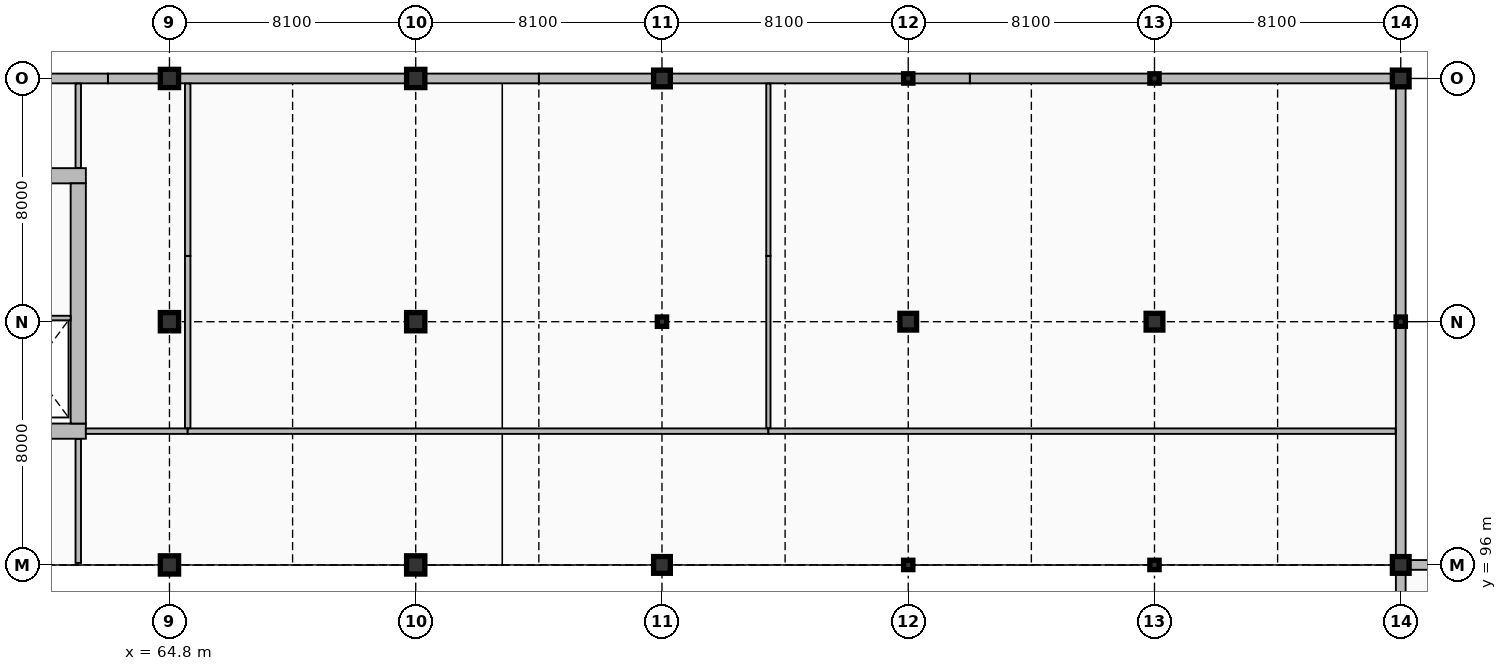
"""IFC4 building model, lengths in metres.
Left out: names, types, materials, properties, quantities, classifications, styles, units other than length and angle.
Written with IfcOpenShell. Run it as: python <this file> out.ifc"""

import sys

from ifc_helpers import new_model, si_unit, direction, frame, frame_2d, origin, origin_2d, place, context, subcontext, project, spatial, rectangle, i_section, extrude, element, fill, save


model = new_model("IFC4")
c1 = context("Model", 3, precision=1e-05, world=origin(), true_north=direction((0.0, 1.0)))
c2 = subcontext(c1, "Body", "Model", "MODEL_VIEW")
j1 = project(units=[si_unit("LENGTHUNIT", "METRE"), si_unit("PLANEANGLEUNIT", "RADIAN")], contexts=[c1])
p1 = place(None, origin())
s1 = spatial("IfcSite", under=j1, at=p1, CompositionType="ELEMENT")
p2 = place(p1, origin())
s2 = spatial("IfcBuilding", under=s1, at=p2, CompositionType="ELEMENT")
p3 = place(p2, frame((0.0, 0.0, 14.7)))
s3 = spatial("IfcBuildingStorey", under=s2, at=p3, CompositionType="ELEMENT", Elevation=14.7)
p4 = place(p3, frame((46.75, 100.4, 0.0), z_axis=(0.0, 0.0, 1.0), x_axis=(1.0, 0.0, 0.0)))
e1 = element("IfcWall", 1, at=p4, inside=s3, PredefinedType="SHEAR", context=c2, shape_type="SweptSolid", body=[
    extrude(rectangle(XDim=15.3, YDim=0.5, at=frame_2d((7.65, 0.0))), origin(), (0.0, 0.0, 1.0), 5.1),
])
p5 = place(p4, frame((1.0, 0.0, 0.0)))
e2 = element("IfcOpeningElement", 2, at=p5, cuts=e1, PredefinedType="OPENING", context=c2, shape_type="SweptSolid", body=[
    extrude(rectangle(XDim=1.15, YDim=2.25, at=frame_2d((0.575, 1.125))), frame((0.0, 0.26, 0.0), z_axis=(0.0, -1.0, 0.0), x_axis=(1.0, 0.0, 0.0)), (0.0, 0.0, 1.0), 0.52),
])
p6 = place(p4, frame((10.282, 0.0, 0.0)))
e3 = element("IfcOpeningElement", 3, at=p6, cuts=e1, PredefinedType="OPENING", context=c2, shape_type="SweptSolid", body=[
    extrude(rectangle(XDim=1.1, YDim=2.2, at=frame_2d((0.55, 1.1))), frame((0.0, 0.26, 0.0), z_axis=(0.0, -1.0, 0.0), x_axis=(1.0, 0.0, 0.0)), (0.0, 0.0, 1.0), 0.52),
])
p7 = place(p4, frame((12.998, 0.0, 0.0)))
e4 = element("IfcOpeningElement", 4, at=p7, cuts=e1, PredefinedType="OPENING", context=c2, shape_type="SweptSolid", body=[
    extrude(rectangle(XDim=1.1, YDim=2.2, at=frame_2d((0.55, 1.1))), frame((0.0, 0.26, 0.0), z_axis=(0.0, -1.0, 0.0), x_axis=(1.0, 0.0, 0.0)), (0.0, 0.0, 1.0), 0.52),
])
p8 = place(p3, frame((46.75, 108.8, 0.0), z_axis=(0.0, 0.0, 1.0), x_axis=(1.0, 0.0, 0.0)))
e5 = element("IfcWall", 5, at=p8, inside=s3, PredefinedType="SHEAR", context=c2, shape_type="SweptSolid", body=[
    extrude(rectangle(XDim=15.3, YDim=0.5, at=frame_2d((7.65, 0.0))), origin(), (0.0, 0.0, 1.0), 5.1),
])
p9 = place(p3, frame((61.8, 100.65, 0.0), z_axis=(0.0, 0.0, 1.0), x_axis=(0.0, 1.0, 0.0)))
e6 = element("IfcWall", 6, at=p9, inside=s3, PredefinedType="SHEAR", context=c2, shape_type="SweptSolid", body=[
    extrude(rectangle(XDim=7.9, YDim=0.5, at=frame_2d((3.95, 0.0))), origin(), (0.0, 0.0, 1.0), 5.1),
])
for number, where, z_axis, x_axis in (
    (7, (64.8, 96.0, 0.0), (0.0, 0.0, 1.0), (1.0, 0.0, 0.0)),
    (8, (64.8, 104.0, 0.0), (0.0, 0.0, 1.0), (1.0, 0.0, 0.0)),
    (9, (64.8, 112.0, 0.0), (0.0, 0.0, 1.0), (1.0, 0.0, 0.0)),
    (10, (72.9, 96.0, 0.0), (0.0, 0.0, 1.0), (1.0, 0.0, 0.0)),
    (11, (72.9, 104.0, 0.0), (0.0, 0.0, 1.0), (1.0, 0.0, 0.0)),
    (12, (72.9, 112.0, 0.0), (0.0, 0.0, 1.0), (1.0, 0.0, 0.0)),
):
    element("IfcColumn", number, at=place(p3, frame(where, z_axis=z_axis, x_axis=x_axis)), inside=s3, PredefinedType="COLUMN", context=c2, shape_type="SweptSolid", body=[
        extrude(rectangle(XDim=0.6, YDim=0.6, at=origin_2d()), origin(), (0.0, 0.0, 1.0), 5.1),
    ])
p10 = place(p3, frame((81.0, 96.0, 0.0), z_axis=(0.0, 0.0, 1.0), x_axis=(1.0, 0.0, 0.0)))
e13 = element("IfcColumn", 13, at=p10, inside=s3, PredefinedType="COLUMN", context=c2, shape_type="SweptSolid", body=[
    extrude(rectangle(XDim=0.55, YDim=0.55, at=origin_2d()), origin(), (0.0, 0.0, 1.0), 5.1),
])
p11 = place(p3, frame((81.0, 104.0, 0.0), z_axis=(0.0, 0.0, 1.0), x_axis=(1.0, 0.0, 0.0)))
e14 = element("IfcColumn", 14, at=p11, inside=s3, PredefinedType="COLUMN", context=c2, shape_type="SweptSolid", body=[
    extrude(i_section(OverallWidth=0.305, OverallDepth=0.308, WebThickness=0.01, FlangeThickness=0.015, FilletRadius=0.015, at=origin_2d()), origin(), (0.0, 0.0, 1.0), 5.1),
])
p12 = place(p3, frame((81.0, 112.0, 0.0), z_axis=(0.0, 0.0, 1.0), x_axis=(1.0, 0.0, 0.0)))
e15 = element("IfcColumn", 15, at=p12, inside=s3, PredefinedType="COLUMN", context=c2, shape_type="SweptSolid", body=[
    extrude(rectangle(XDim=0.55, YDim=0.55, at=origin_2d()), origin(), (0.0, 0.0, 1.0), 5.1),
])
p13 = place(p3, frame((89.1, 96.0, 0.0), z_axis=(0.0, 0.0, 1.0), x_axis=(1.0, 0.0, 0.0)))
e16 = element("IfcColumn", 16, at=p13, inside=s3, PredefinedType="COLUMN", context=c2, shape_type="SweptSolid", body=[
    extrude(i_section(OverallWidth=0.305, OverallDepth=0.308, WebThickness=0.01, FlangeThickness=0.015, FilletRadius=0.015, at=origin_2d()), origin(), (0.0, 0.0, 1.0), 5.1),
])
p14 = place(p3, frame((89.1, 104.0, 0.0), z_axis=(0.0, 0.0, 1.0), x_axis=(1.0, 0.0, 0.0)))
e17 = element("IfcColumn", 17, at=p14, inside=s3, PredefinedType="COLUMN", context=c2, shape_type="SweptSolid", body=[
    extrude(rectangle(XDim=0.55, YDim=0.55, at=origin_2d()), origin(), (0.0, 0.0, 1.0), 5.1),
])
for number, where, z_axis, x_axis in (
    (18, (89.1, 112.0, 0.0), (0.0, 0.0, 1.0), (1.0, 0.0, 0.0)),
    (19, (97.2, 96.0, 0.0), (0.0, 0.0, 1.0), (1.0, 0.0, 0.0)),
):
    element("IfcColumn", number, at=place(p3, frame(where, z_axis=z_axis, x_axis=x_axis)), inside=s3, PredefinedType="COLUMN", context=c2, shape_type="SweptSolid", body=[
        extrude(i_section(OverallWidth=0.305, OverallDepth=0.308, WebThickness=0.01, FlangeThickness=0.015, FilletRadius=0.015, at=origin_2d()), origin(), (0.0, 0.0, 1.0), 5.1),
    ])
p15 = place(p3, frame((97.2, 104.0, 0.0), z_axis=(0.0, 0.0, 1.0), x_axis=(1.0, 0.0, 0.0)))
e20 = element("IfcColumn", 20, at=p15, inside=s3, PredefinedType="COLUMN", context=c2, shape_type="SweptSolid", body=[
    extrude(rectangle(XDim=0.55, YDim=0.55, at=origin_2d()), origin(), (0.0, 0.0, 1.0), 5.1),
])
p16 = place(p3, frame((97.2, 112.0, 0.0), z_axis=(0.0, 0.0, 1.0), x_axis=(1.0, 0.0, 0.0)))
e21 = element("IfcColumn", 21, at=p16, inside=s3, PredefinedType="COLUMN", context=c2, shape_type="SweptSolid", body=[
    extrude(i_section(OverallWidth=0.305, OverallDepth=0.308, WebThickness=0.01, FlangeThickness=0.015, FilletRadius=0.015, at=origin_2d()), origin(), (0.0, 0.0, 1.0), 5.1),
])
p17 = place(p3, frame((105.3, 96.0, 0.0), z_axis=(0.0, 0.0, 1.0), x_axis=(1.0, 0.0, 0.0)))
e22 = element("IfcColumn", 22, at=p17, inside=s3, PredefinedType="COLUMN", context=c2, shape_type="SweptSolid", body=[
    extrude(rectangle(XDim=0.55, YDim=0.55, at=origin_2d()), origin(), (0.0, 0.0, 1.0), 5.1),
])
p18 = place(p3, frame((105.3, 104.0, 0.0), z_axis=(0.0, 0.0, 1.0), x_axis=(1.0, 0.0, 0.0)))
e23 = element("IfcColumn", 23, at=p18, inside=s3, PredefinedType="COLUMN", context=c2, shape_type="SweptSolid", body=[
    extrude(i_section(OverallWidth=0.305, OverallDepth=0.308, WebThickness=0.01, FlangeThickness=0.015, FilletRadius=0.015, at=origin_2d()), origin(), (0.0, 0.0, 1.0), 5.1),
])
p19 = place(p3, frame((105.3, 112.0, 0.0), z_axis=(0.0, 0.0, 1.0), x_axis=(1.0, 0.0, 0.0)))
e24 = element("IfcColumn", 24, at=p19, inside=s3, PredefinedType="COLUMN", context=c2, shape_type="SweptSolid", body=[
    extrude(rectangle(XDim=0.55, YDim=0.55, at=origin_2d()), origin(), (0.0, 0.0, 1.0), 5.1),
])
p20 = place(p3, frame((117.54, 96.0, 0.0), z_axis=(0.0, 0.0, 1.0), x_axis=(-1.0, 0.0, 0.0)))
e25 = element("IfcWall", 25, at=p20, inside=s3, PredefinedType="SOLIDWALL", context=c2, shape_type="SweptSolid", body=[
    extrude(rectangle(XDim=12.06, YDim=0.32, at=frame_2d((6.03, 0.0))), origin(), (0.0, 0.0, 1.0), 4.144),
])
p21 = place(p20, frame((7.2, 0.0, 0.85)))
e26 = element("IfcOpeningElement", 26, at=p21, cuts=e25, PredefinedType="OPENING", context=c2, shape_type="SweptSolid", body=[
    extrude(rectangle(XDim=1.8, YDim=2.1, at=frame_2d((0.9, 1.05))), frame((0.0, 0.17, 0.0), z_axis=(0.0, -1.0, 0.0), x_axis=(1.0, 0.0, 0.0)), (0.0, 0.0, 1.0), 0.34),
])
p22 = place(p3, frame((105.3, 96.18, 0.0), z_axis=(0.0, 0.0, 1.0), x_axis=(0.0, 1.0, 0.0)))
e27 = element("IfcWall", 27, at=p22, inside=s3, PredefinedType="SOLIDWALL", context=c2, shape_type="SweptSolid", body=[
    extrude(rectangle(XDim=15.82, YDim=0.32, at=frame_2d((7.91, 0.0))), origin(), (0.0, 0.0, 1.0), 4.332),
])
p23 = place(p22, frame((9.45, 0.0, 0.85)))
e28 = element("IfcOpeningElement", 28, at=p23, cuts=e27, PredefinedType="OPENING", context=c2, shape_type="SweptSolid", body=[
    extrude(rectangle(XDim=1.8, YDim=2.4, at=frame_2d((0.9, 1.2))), frame((0.0, 0.17, 0.0), z_axis=(0.0, -1.0, 0.0), x_axis=(1.0, 0.0, 0.0)), (0.0, 0.0, 1.0), 0.34),
])
p24 = place(p3, frame((105.3, 112.0, 0.0), z_axis=(0.0, 0.0, 1.0), x_axis=(-1.0, 0.0, 0.0)))
e29 = element("IfcWall", 29, at=p24, inside=s3, PredefinedType="SOLIDWALL", context=c2, shape_type="SweptSolid", body=[
    extrude(rectangle(XDim=14.175, YDim=0.32, at=frame_2d((7.087, 0.0))), origin(), (0.0, 0.0, 1.0), 4.232),
])
p25 = place(p24, frame((3.6, 0.0, 0.95)))
e30 = element("IfcOpeningElement", 30, at=p25, cuts=e29, PredefinedType="OPENING", context=c2, shape_type="SweptSolid", body=[
    extrude(rectangle(XDim=2.1, YDim=1.8, at=frame_2d((1.05, 0.9))), frame((0.0, 0.17, 0.0), z_axis=(0.0, -1.0, 0.0), x_axis=(1.0, 0.0, 0.0)), (0.0, 0.0, 1.0), 0.34),
])
p26 = place(p3, frame((91.125, 112.0, 0.0), z_axis=(0.0, 0.0, 1.0), x_axis=(-1.0, 0.0, 0.0)))
e31 = element("IfcWall", 31, at=p26, inside=s3, PredefinedType="SOLIDWALL", context=c2, shape_type="SweptSolid", body=[
    extrude(rectangle(XDim=14.175, YDim=0.32, at=frame_2d((7.087, 0.0))), origin(), (0.0, 0.0, 1.0), 4.232),
])
p27 = place(p26, frame((3.6, 0.0, 0.95)))
e32 = element("IfcOpeningElement", 32, at=p27, cuts=e31, PredefinedType="OPENING", context=c2, shape_type="SweptSolid", body=[
    extrude(rectangle(XDim=2.25, YDim=1.8, at=frame_2d((1.125, 0.9))), frame((0.0, 0.17, 0.0), z_axis=(0.0, -1.0, 0.0), x_axis=(1.0, 0.0, 0.0)), (0.0, 0.0, 1.0), 0.34),
])
p28 = place(p3, frame((76.95, 112.0, 0.0), z_axis=(0.0, 0.0, 1.0), x_axis=(-1.0, 0.0, 0.0)))
e33 = element("IfcWall", 33, at=p28, inside=s3, PredefinedType="SOLIDWALL", context=c2, shape_type="SweptSolid", body=[
    extrude(rectangle(XDim=14.175, YDim=0.32, at=frame_2d((7.087, 0.0))), origin(), (0.0, 0.0, 1.0), 4.232),
])
p29 = place(p28, frame((5.85, 0.0, 0.95)))
e34 = element("IfcOpeningElement", 34, at=p29, cuts=e33, PredefinedType="OPENING", context=c2, shape_type="SweptSolid", body=[
    extrude(rectangle(XDim=2.4, YDim=1.6, at=frame_2d((1.2, 0.8))), frame((0.0, 0.17, 0.0), z_axis=(0.0, -1.0, 0.0), x_axis=(1.0, 0.0, 0.0)), (0.0, 0.0, 1.0), 0.34),
])
p30 = place(p3, frame((62.775, 112.0, 0.0), z_axis=(0.0, 0.0, 1.0), x_axis=(-1.0, 0.0, 0.0)))
e35 = element("IfcWall", 35, at=p30, inside=s3, PredefinedType="SOLIDWALL", context=c2, shape_type="SweptSolid", body=[
    extrude(rectangle(XDim=14.175, YDim=0.32, at=frame_2d((7.087, 0.0))), origin(), (0.0, 0.0, 1.0), 4.232),
])
p31 = place(p30, frame((8.1, 0.0, 0.95)))
e36 = element("IfcOpeningElement", 36, at=p31, cuts=e35, PredefinedType="OPENING", context=c2, shape_type="SweptSolid", body=[
    extrude(rectangle(XDim=2.7, YDim=1.8, at=frame_2d((1.35, 0.9))), frame((0.0, 0.17, 0.0), z_axis=(0.0, -1.0, 0.0), x_axis=(1.0, 0.0, 0.0)), (0.0, 0.0, 1.0), 0.34),
])
p32 = place(p3, frame((105.3, 95.82, 0.0), z_axis=(0.0, 0.0, 1.0), x_axis=(0.0, -1.0, 0.0)))
e37 = element("IfcWall", 37, at=p32, inside=s3, PredefinedType="SOLIDWALL", context=c2, shape_type="SweptSolid", body=[
    extrude(rectangle(XDim=15.64, YDim=0.32, at=frame_2d((7.82, 0.0))), origin(), (0.0, 0.0, 1.0), 4.332),
])
p33 = place(p32, frame((4.95, 0.0, 0.85)))
e38 = element("IfcOpeningElement", 38, at=p33, cuts=e37, PredefinedType="OPENING", context=c2, shape_type="SweptSolid", body=[
    extrude(rectangle(XDim=0.75, YDim=2.2, at=frame_2d((0.375, 1.1))), frame((0.0, 0.17, 0.0), z_axis=(0.0, -1.0, 0.0), x_axis=(1.0, 0.0, 0.0)), (0.0, 0.0, 1.0), 0.34),
])
p34 = place(p3, frame((56.3, 104.12, 0.0), z_axis=(0.0, 0.0, 1.0), x_axis=(1.0, 0.0, 0.0)))
e39 = element("IfcWall", 39, at=p34, inside=s3, PredefinedType="PARTITIONING", context=c2, shape_type="SweptSolid", body=[
    extrude(rectangle(XDim=5.25, YDim=0.15, at=frame_2d((2.625, 0.0))), origin(), (0.0, 0.0, 1.0), 4.84),
])
p35 = place(p3, frame((62.05, 100.4, 0.0), z_axis=(0.0, 0.0, 1.0), x_axis=(1.0, 0.0, 0.0)))
e40 = element("IfcWall", 40, at=p35, inside=s3, PredefinedType="PARTITIONING", context=c2, shape_type="SweptSolid", body=[
    extrude(rectangle(XDim=3.35, YDim=0.18, at=frame_2d((1.675, 0.0))), origin(), (0.0, 0.0, 1.0), 4.84),
])
p36 = place(p35, frame((1.075, 0.0, 0.0)))
e41 = element("IfcOpeningElement", 41, at=p36, cuts=e40, PredefinedType="OPENING", context=c2, shape_type="SweptSolid", body=[
    extrude(rectangle(XDim=1.2, YDim=2.2, at=frame_2d((0.6, 1.1))), frame((0.0, 0.1, 0.0), z_axis=(0.0, -1.0, 0.0), x_axis=(1.0, 0.0, 0.0)), (0.0, 0.0, 1.0), 0.2),
])
p37 = place(p3, frame((65.4, 100.4, 0.0), z_axis=(0.0, 0.0, 1.0), x_axis=(1.0, 0.0, 0.0)))
e42 = element("IfcWall", 42, at=p37, inside=s3, PredefinedType="PARTITIONING", context=c2, shape_type="SweptSolid", body=[
    extrude(rectangle(XDim=19.1, YDim=0.18, at=frame_2d((9.55, 0.0))), origin(), (0.0, 0.0, 1.0), 4.84),
])
p38 = place(p37, frame((8.95, 0.0, 0.0)))
e43 = element("IfcOpeningElement", 43, at=p38, cuts=e42, PredefinedType="OPENING", context=c2, shape_type="SweptSolid", body=[
    extrude(rectangle(XDim=1.2, YDim=2.3, at=frame_2d((0.6, 1.15))), frame((0.0, 0.1, 0.0), z_axis=(0.0, -1.0, 0.0), x_axis=(1.0, 0.0, 0.0)), (0.0, 0.0, 1.0), 0.2),
])
p39 = place(p3, frame((84.5, 100.4, 0.0), z_axis=(0.0, 0.0, 1.0), x_axis=(1.0, 0.0, 0.0)))
e44 = element("IfcWall", 44, at=p39, inside=s3, PredefinedType="PARTITIONING", context=c2, shape_type="SweptSolid", body=[
    extrude(rectangle(XDim=20.632, YDim=0.18, at=frame_2d((10.316, 0.0))), origin(), (0.0, 0.0, 1.0), 4.84),
])
p40 = place(p39, frame((9.716, 0.0, 0.0)))
e45 = element("IfcOpeningElement", 45, at=p40, cuts=e44, PredefinedType="OPENING", context=c2, shape_type="SweptSolid", body=[
    extrude(rectangle(XDim=1.2, YDim=2.3, at=frame_2d((0.6, 1.15))), frame((0.0, 0.1, 0.0), z_axis=(0.0, -1.0, 0.0), x_axis=(1.0, 0.0, 0.0)), (0.0, 0.0, 1.0), 0.2),
])
p41 = place(p3, frame((61.8, 96.065, 0.0), z_axis=(0.0, 0.0, 1.0), x_axis=(0.0, 1.0, 0.0)))
e46 = element("IfcWall", 46, at=p41, inside=s3, PredefinedType="PARTITIONING", context=c2, shape_type="SweptSolid", body=[
    extrude(rectangle(XDim=4.077, YDim=0.18, at=frame_2d((2.039, 0.0))), origin(), (0.0, 0.0, 1.0), 4.84),
])
p42 = place(p41, frame((1.489, 0.0, 0.0)))
e47 = element("IfcOpeningElement", 47, at=p42, cuts=e46, PredefinedType="OPENING", context=c2, shape_type="SweptSolid", body=[
    extrude(rectangle(XDim=1.1, YDim=2.2, at=frame_2d((0.55, 1.1))), frame((0.0, 0.1, 0.0), z_axis=(0.0, -1.0, 0.0), x_axis=(1.0, 0.0, 0.0)), (0.0, 0.0, 1.0), 0.2),
])
p43 = place(p3, frame((61.8, 109.058, 0.0), z_axis=(0.0, 0.0, 1.0), x_axis=(0.0, 1.0, 0.0)))
e48 = element("IfcWall", 48, at=p43, inside=s3, PredefinedType="PARTITIONING", context=c2, shape_type="SweptSolid", body=[
    extrude(rectangle(XDim=2.774, YDim=0.18, at=frame_2d((1.387, 0.0))), origin(), (0.0, 0.0, 1.0), 4.84),
])
p44 = place(p43, frame((0.837, 0.0, 0.0)))
e49 = element("IfcOpeningElement", 49, at=p44, cuts=e48, PredefinedType="OPENING", context=c2, shape_type="SweptSolid", body=[
    extrude(rectangle(XDim=1.1, YDim=2.2, at=frame_2d((0.55, 1.1))), frame((0.0, 0.1, 0.0), z_axis=(0.0, -1.0, 0.0), x_axis=(1.0, 0.0, 0.0)), (0.0, 0.0, 1.0), 0.2),
])
for number, where, z_axis, x_axis in (
    (50, (65.4, 100.498, 0.0), (0.0, 0.0, 1.0), (0.0, 1.0, 0.0)),
    (51, (65.4, 106.165, 0.0), (0.0, 0.0, 1.0), (0.0, 1.0, 0.0)),
):
    element("IfcWall", number, at=place(p3, frame(where, z_axis=z_axis, x_axis=x_axis)), inside=s3, PredefinedType="PARTITIONING", context=c2, shape_type="SweptSolid", body=[
        extrude(rectangle(XDim=5.667, YDim=0.18, at=frame_2d((2.833, 0.0))), origin(), (0.0, 0.0, 1.0), 4.84),
    ])
for number, where, z_axis, x_axis in (
    (52, (84.5, 100.498, 0.0), (0.0, 0.0, 1.0), (0.0, 1.0, 0.0)),
    (53, (84.5, 106.165, 0.0), (0.0, 0.0, 1.0), (0.0, 1.0, 0.0)),
):
    element("IfcWall", number, at=place(p3, frame(where, z_axis=z_axis, x_axis=x_axis)), inside=s3, PredefinedType="PARTITIONING", context=c2, shape_type="SweptSolid", body=[
        extrude(rectangle(XDim=5.667, YDim=0.14, at=frame_2d((2.833, 0.0))), origin(), (0.0, 0.0, 1.0), 4.84),
    ])
p45 = place(p23, origin())
e54 = element("IfcWindow", 54, at=p45, inside=s3, PartitioningType="TRIPLE_PANEL_VERTICAL", PredefinedType="WINDOW", context=c2, shape_type="SweptSolid", body=[
    extrude(rectangle(XDim=1.8, YDim=2.4, at=frame_2d((0.9, 1.2))), frame((0.0, 0.03, 0.0), z_axis=(0.0, -1.0, 0.0), x_axis=(1.0, 0.0, 0.0)), (0.0, 0.0, 1.0), 0.06),
])
fill(e28, e54)
p46 = place(p25, origin())
e55 = element("IfcWindow", 55, at=p46, inside=s3, PartitioningType="DOUBLE_PANEL_VERTICAL", PredefinedType="WINDOW", context=c2, shape_type="SweptSolid", body=[
    extrude(rectangle(XDim=2.1, YDim=1.8, at=frame_2d((1.05, 0.9))), frame((0.0, 0.03, 0.0), z_axis=(0.0, -1.0, 0.0), x_axis=(1.0, 0.0, 0.0)), (0.0, 0.0, 1.0), 0.06),
])
fill(e30, e55)
p47 = place(p27, origin())
e56 = element("IfcWindow", 56, at=p47, inside=s3, PartitioningType="TRIPLE_PANEL_VERTICAL", PredefinedType="WINDOW", context=c2, shape_type="SweptSolid", body=[
    extrude(rectangle(XDim=2.25, YDim=1.8, at=frame_2d((1.125, 0.9))), frame((0.0, 0.03, 0.0), z_axis=(0.0, -1.0, 0.0), x_axis=(1.0, 0.0, 0.0)), (0.0, 0.0, 1.0), 0.06),
])
fill(e32, e56)
p48 = place(p29, origin())
e57 = element("IfcWindow", 57, at=p48, inside=s3, PartitioningType="TRIPLE_PANEL_VERTICAL", PredefinedType="WINDOW", context=c2, shape_type="SweptSolid", body=[
    extrude(rectangle(XDim=2.4, YDim=1.6, at=frame_2d((1.2, 0.8))), frame((0.0, 0.03, 0.0), z_axis=(0.0, -1.0, 0.0), x_axis=(1.0, 0.0, 0.0)), (0.0, 0.0, 1.0), 0.06),
])
fill(e34, e57)
p49 = place(p36, frame((1.2, 0.0, 0.0), z_axis=(0.0, 0.0, 1.0), x_axis=(-1.0, 0.0, 0.0)))
e58 = element("IfcDoor", 58, at=p49, inside=s3, OperationType="SINGLE_SWING_RIGHT", PredefinedType="DOOR", context=c2, shape_type="SweptSolid", body=[
    extrude(rectangle(XDim=1.2, YDim=2.2, at=frame_2d((0.6, 1.1))), frame((0.0, 0.025, 0.0), z_axis=(0.0, -1.0, 0.0), x_axis=(1.0, 0.0, 0.0)), (0.0, 0.0, 1.0), 0.05),
])
fill(e41, e58)
p50 = place(p38, origin())
e59 = element("IfcDoor", 59, at=p50, inside=s3, OperationType="SINGLE_SWING_LEFT", PredefinedType="DOOR", context=c2, shape_type="SweptSolid", body=[
    extrude(rectangle(XDim=1.2, YDim=2.3, at=frame_2d((0.6, 1.15))), frame((0.0, 0.025, 0.0), z_axis=(0.0, -1.0, 0.0), x_axis=(1.0, 0.0, 0.0)), (0.0, 0.0, 1.0), 0.05),
])
fill(e43, e59)
p51 = place(p40, origin())
e60 = element("IfcDoor", 60, at=p51, inside=s3, OperationType="SINGLE_SWING_RIGHT", PredefinedType="DOOR", context=c2, shape_type="SweptSolid", body=[
    extrude(rectangle(XDim=1.2, YDim=2.3, at=frame_2d((0.6, 1.15))), frame((0.0, 0.025, 0.0), z_axis=(0.0, -1.0, 0.0), x_axis=(1.0, 0.0, 0.0)), (0.0, 0.0, 1.0), 0.05),
])
fill(e45, e60)
p52 = place(p42, frame((1.1, 0.0, 0.0), z_axis=(0.0, 0.0, 1.0), x_axis=(-1.0, 0.0, 0.0)))
e61 = element("IfcDoor", 61, at=p52, inside=s3, OperationType="SINGLE_SWING_RIGHT", PredefinedType="DOOR", context=c2, shape_type="SweptSolid", body=[
    extrude(rectangle(XDim=1.1, YDim=2.2, at=frame_2d((0.55, 1.1))), frame((0.0, 0.025, 0.0), z_axis=(0.0, -1.0, 0.0), x_axis=(1.0, 0.0, 0.0)), (0.0, 0.0, 1.0), 0.05),
])
fill(e47, e61)
p53 = place(p44, origin())
e62 = element("IfcDoor", 62, at=p53, inside=s3, OperationType="SINGLE_SWING_LEFT", PredefinedType="DOOR", context=c2, shape_type="SweptSolid", body=[
    extrude(rectangle(XDim=1.1, YDim=2.2, at=frame_2d((0.55, 1.1))), frame((0.0, 0.025, 0.0), z_axis=(0.0, -1.0, 0.0), x_axis=(1.0, 0.0, 0.0)), (0.0, 0.0, 1.0), 0.05),
])
fill(e49, e62)
save(model, sys.argv[1])
